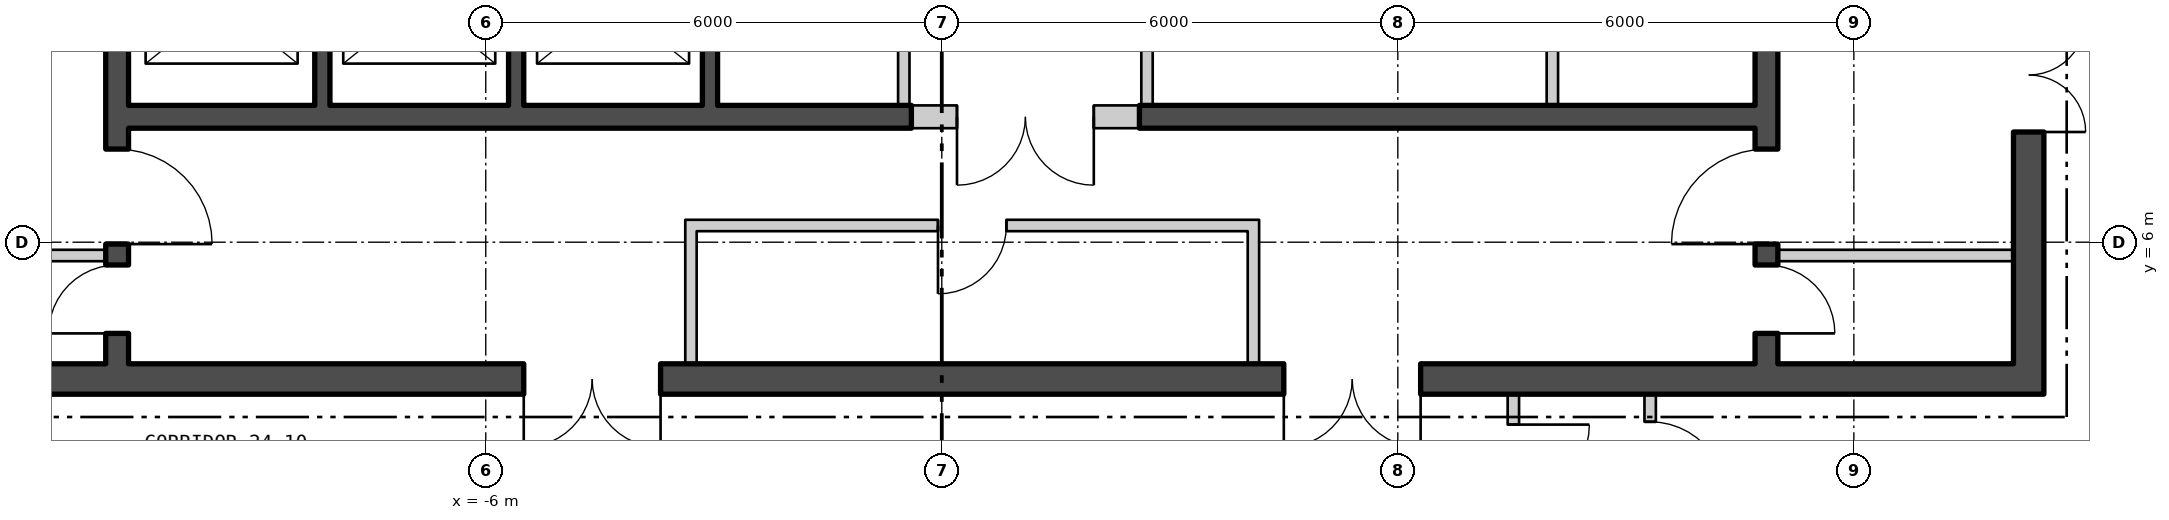
"""IFC4 building model, lengths in metres.
Left out: names, types, materials, properties, quantities, classifications, styles, units other than length and angle.
Written with IfcOpenShell. Run it as: python <this file> out.ifc"""

import sys

from ifc_helpers import new_model, si_unit, direction, frame, frame_2d, origin, place, context, subcontext, project, spatial, polyline, rectangle, outline, extrude, element, fill, save


model = new_model("IFC4")
c1 = context("Model", 3, precision=1e-05, world=origin(), true_north=direction((0.0, 1.0)))
c2 = subcontext(c1, "Body", "Model", "MODEL_VIEW")
j1 = project(units=[si_unit("LENGTHUNIT", "METRE"), si_unit("PLANEANGLEUNIT", "RADIAN")], contexts=[c1])
p1 = place(None, origin())
s1 = spatial("IfcSite", under=j1, at=p1, CompositionType="ELEMENT")
p2 = place(p1, origin())
s2 = spatial("IfcBuilding", under=s1, at=p2, CompositionType="ELEMENT")
p3 = place(p2, frame((0.0, 0.0, 312.6)))
s3 = spatial("IfcBuildingStorey", under=s2, at=p3, CompositionType="ELEMENT", Elevation=312.6)
p4 = place(p3, frame((-24.985, 16.303, -0.18), z_axis=(0.0, 0.0, 1.0), x_axis=(0.500000141277, -0.866025322218, 0.0)))
e1 = element("IfcWall", 1, at=p4, inside=s3, PredefinedType="SOLIDWALL", context=c2, shape_type="SweptSolid", body=[
    extrude(outline(polyline([(-0.13, -0.225), (45.86, -0.225), (45.6, 0.225), (0.13, 0.225), (-0.13, -0.225)])), origin(), (0.0, 0.0, 1.0), 3.98),
])
p5 = place(p4, frame((1.424, 0.0, 1.08)))
e2 = element("IfcOpeningElement", 2, at=p5, cuts=e1, PredefinedType="OPENING", context=c2, shape_type="SweptSolid", body=[
    extrude(rectangle(XDim=2.4, YDim=2.3, at=frame_2d((1.2, 1.15))), frame((0.0, 0.235, 0.0), z_axis=(0.0, -1.0, 0.0), x_axis=(1.0, 0.0, 0.0)), (0.0, 0.0, 1.0), 0.47),
])
p6 = place(p4, frame((5.892, 0.0, 1.08)))
e3 = element("IfcOpeningElement", 3, at=p6, cuts=e1, PredefinedType="OPENING", context=c2, shape_type="SweptSolid", body=[
    extrude(rectangle(XDim=2.4, YDim=2.3, at=frame_2d((1.2, 1.15))), frame((0.0, 0.235, 0.0), z_axis=(0.0, -1.0, 0.0), x_axis=(1.0, 0.0, 0.0)), (0.0, 0.0, 1.0), 0.47),
])
p7 = place(p4, frame((10.399, 0.0, 1.08)))
e4 = element("IfcOpeningElement", 4, at=p7, cuts=e1, PredefinedType="OPENING", context=c2, shape_type="SweptSolid", body=[
    extrude(rectangle(XDim=2.4, YDim=2.3, at=frame_2d((1.2, 1.15))), frame((0.0, 0.235, 0.0), z_axis=(0.0, -1.0, 0.0), x_axis=(1.0, 0.0, 0.0)), (0.0, 0.0, 1.0), 0.47),
])
p8 = place(p4, frame((14.905, 0.0, 1.08)))
e5 = element("IfcOpeningElement", 5, at=p8, cuts=e1, PredefinedType="OPENING", context=c2, shape_type="SweptSolid", body=[
    extrude(rectangle(XDim=2.4, YDim=2.3, at=frame_2d((1.2, 1.15))), frame((0.0, 0.235, 0.0), z_axis=(0.0, -1.0, 0.0), x_axis=(1.0, 0.0, 0.0)), (0.0, 0.0, 1.0), 0.47),
])
p9 = place(p4, frame((19.412, 0.0, 1.08)))
e6 = element("IfcOpeningElement", 6, at=p9, cuts=e1, PredefinedType="OPENING", context=c2, shape_type="SweptSolid", body=[
    extrude(rectangle(XDim=2.4, YDim=2.3, at=frame_2d((1.2, 1.15))), frame((0.0, 0.235, 0.0), z_axis=(0.0, -1.0, 0.0), x_axis=(1.0, 0.0, 0.0)), (0.0, 0.0, 1.0), 0.47),
])
p10 = place(p4, frame((23.918, 0.0, 1.08)))
e7 = element("IfcOpeningElement", 7, at=p10, cuts=e1, PredefinedType="OPENING", context=c2, shape_type="SweptSolid", body=[
    extrude(rectangle(XDim=2.4, YDim=2.3, at=frame_2d((1.2, 1.15))), frame((0.0, 0.235, 0.0), z_axis=(0.0, -1.0, 0.0), x_axis=(1.0, 0.0, 0.0)), (0.0, 0.0, 1.0), 0.47),
])
p11 = place(p4, frame((28.425, 0.0, 1.08)))
e8 = element("IfcOpeningElement", 8, at=p11, cuts=e1, PredefinedType="OPENING", context=c2, shape_type="SweptSolid", body=[
    extrude(rectangle(XDim=2.4, YDim=2.3, at=frame_2d((1.2, 1.15))), frame((0.0, 0.235, 0.0), z_axis=(0.0, -1.0, 0.0), x_axis=(1.0, 0.0, 0.0)), (0.0, 0.0, 1.0), 0.47),
])
p12 = place(p4, frame((37.438, 0.0, 1.08)))
e9 = element("IfcOpeningElement", 9, at=p12, cuts=e1, PredefinedType="OPENING", context=c2, shape_type="SweptSolid", body=[
    extrude(rectangle(XDim=2.4, YDim=2.3, at=frame_2d((1.2, 1.15))), frame((0.0, 0.235, 0.0), z_axis=(0.0, -1.0, 0.0), x_axis=(1.0, 0.0, 0.0)), (0.0, 0.0, 1.0), 0.47),
])
p13 = place(p4, frame((41.907, 0.0, 1.08)))
e10 = element("IfcOpeningElement", 10, at=p13, cuts=e1, PredefinedType="OPENING", context=c2, shape_type="SweptSolid", body=[
    extrude(rectangle(XDim=2.4, YDim=2.3, at=frame_2d((1.2, 1.15))), frame((0.0, 0.235, 0.0), z_axis=(0.0, -1.0, 0.0), x_axis=(1.0, 0.0, 0.0)), (0.0, 0.0, 1.0), 0.47),
])
p14 = place(p3, frame((2.12, -23.301, -0.18), z_axis=(0.0, 0.0, 1.0), x_axis=(0.500000141277, 0.866025322218, 0.0)))
e11 = element("IfcWall", 11, at=p14, inside=s3, PredefinedType="SOLIDWALL", context=c2, shape_type="SweptSolid", body=[
    extrude(outline(polyline([(-0.13, -0.225), (45.86, -0.225), (45.6, 0.225), (0.13, 0.225), (-0.13, -0.225)])), origin(), (0.0, 0.0, 1.0), 3.98),
])
p15 = place(p14, frame((1.424, 0.0, 1.08)))
e12 = element("IfcOpeningElement", 12, at=p15, cuts=e11, PredefinedType="OPENING", context=c2, shape_type="SweptSolid", body=[
    extrude(rectangle(XDim=2.4, YDim=2.3, at=frame_2d((1.2, 1.15))), frame((0.0, 0.235, 0.0), z_axis=(0.0, -1.0, 0.0), x_axis=(1.0, 0.0, 0.0)), (0.0, 0.0, 1.0), 0.47),
])
p16 = place(p14, frame((5.892, 0.0, 1.08)))
e13 = element("IfcOpeningElement", 13, at=p16, cuts=e11, PredefinedType="OPENING", context=c2, shape_type="SweptSolid", body=[
    extrude(rectangle(XDim=2.4, YDim=2.3, at=frame_2d((1.2, 1.15))), frame((0.0, 0.235, 0.0), z_axis=(0.0, -1.0, 0.0), x_axis=(1.0, 0.0, 0.0)), (0.0, 0.0, 1.0), 0.47),
])
p17 = place(p14, frame((14.905, 0.0, 1.08)))
e14 = element("IfcOpeningElement", 14, at=p17, cuts=e11, PredefinedType="OPENING", context=c2, shape_type="SweptSolid", body=[
    extrude(rectangle(XDim=2.4, YDim=2.3, at=frame_2d((1.2, 1.15))), frame((0.0, 0.235, 0.0), z_axis=(0.0, -1.0, 0.0), x_axis=(1.0, 0.0, 0.0)), (0.0, 0.0, 1.0), 0.47),
])
p18 = place(p14, frame((19.412, 0.0, 1.08)))
e15 = element("IfcOpeningElement", 15, at=p18, cuts=e11, PredefinedType="OPENING", context=c2, shape_type="SweptSolid", body=[
    extrude(rectangle(XDim=2.4, YDim=2.3, at=frame_2d((1.2, 1.15))), frame((0.0, 0.235, 0.0), z_axis=(0.0, -1.0, 0.0), x_axis=(1.0, 0.0, 0.0)), (0.0, 0.0, 1.0), 0.47),
])
p19 = place(p14, frame((23.918, 0.0, 1.08)))
e16 = element("IfcOpeningElement", 16, at=p19, cuts=e11, PredefinedType="OPENING", context=c2, shape_type="SweptSolid", body=[
    extrude(rectangle(XDim=2.4, YDim=2.3, at=frame_2d((1.2, 1.15))), frame((0.0, 0.235, 0.0), z_axis=(0.0, -1.0, 0.0), x_axis=(1.0, 0.0, 0.0)), (0.0, 0.0, 1.0), 0.47),
])
p20 = place(p14, frame((28.425, 0.0, 1.08)))
e17 = element("IfcOpeningElement", 17, at=p20, cuts=e11, PredefinedType="OPENING", context=c2, shape_type="SweptSolid", body=[
    extrude(rectangle(XDim=2.4, YDim=2.3, at=frame_2d((1.2, 1.15))), frame((0.0, 0.235, 0.0), z_axis=(0.0, -1.0, 0.0), x_axis=(1.0, 0.0, 0.0)), (0.0, 0.0, 1.0), 0.47),
])
p21 = place(p14, frame((37.438, 0.0, 1.08)))
e18 = element("IfcOpeningElement", 18, at=p21, cuts=e11, PredefinedType="OPENING", context=c2, shape_type="SweptSolid", body=[
    extrude(rectangle(XDim=2.4, YDim=2.3, at=frame_2d((1.2, 1.15))), frame((0.0, 0.235, 0.0), z_axis=(0.0, -1.0, 0.0), x_axis=(1.0, 0.0, 0.0)), (0.0, 0.0, 1.0), 0.47),
])
p22 = place(p14, frame((41.907, 0.0, 1.08)))
e19 = element("IfcOpeningElement", 19, at=p22, cuts=e11, PredefinedType="OPENING", context=c2, shape_type="SweptSolid", body=[
    extrude(rectangle(XDim=2.4, YDim=2.3, at=frame_2d((1.2, 1.15))), frame((0.0, 0.235, 0.0), z_axis=(0.0, -1.0, 0.0), x_axis=(1.0, 0.0, 0.0)), (0.0, 0.0, 1.0), 0.47),
])
p23 = place(p3, frame((-14.5, 4.2, 0.0), z_axis=(0.0, 0.0, 1.0), x_axis=(1.0, 0.0, 0.0)))
e20 = element("IfcWall", 20, at=p23, inside=s3, PredefinedType="SHEAR", context=c2, shape_type="SweptSolid", body=[
    extrude(rectangle(XDim=29.0, YDim=0.4, at=frame_2d((14.5, 0.0))), origin(), (0.0, 0.0, 1.0), 4.0),
])
p24 = place(p23, frame((9.0, 0.0, 0.0)))
e21 = element("IfcOpeningElement", 21, at=p24, cuts=e20, PredefinedType="OPENING", context=c2, shape_type="SweptSolid", body=[
    extrude(rectangle(XDim=1.8, YDim=2.4, at=frame_2d((0.9, 1.2))), frame((0.0, 0.21, 0.0), z_axis=(0.0, -1.0, 0.0), x_axis=(1.0, 0.0, 0.0)), (0.0, 0.0, 1.0), 0.42),
])
p25 = place(p23, frame((19.0, 0.0, 0.0)))
e22 = element("IfcOpeningElement", 22, at=p25, cuts=e20, PredefinedType="OPENING", context=c2, shape_type="SweptSolid", body=[
    extrude(rectangle(XDim=1.8, YDim=2.4, at=frame_2d((0.9, 1.2))), frame((0.0, 0.21, 0.0), z_axis=(0.0, -1.0, 0.0), x_axis=(1.0, 0.0, 0.0)), (0.0, 0.0, 1.0), 0.42),
])
p26 = place(p3, frame((14.3, 4.4, 0.0), z_axis=(0.0, 0.0, 1.0), x_axis=(0.0, 1.0, 0.0)))
e23 = element("IfcWall", 23, at=p26, inside=s3, PredefinedType="SHEAR", context=c2, shape_type="SweptSolid", body=[
    extrude(rectangle(XDim=13.2, YDim=0.4, at=frame_2d((6.6, 0.0))), origin(), (0.0, 0.0, 1.0), 4.0),
])
p27 = place(p26, frame((3.05, 0.0, 0.0)))
e24 = element("IfcOpeningElement", 24, at=p27, cuts=e23, PredefinedType="OPENING", context=c2, shape_type="SweptSolid", body=[
    extrude(rectangle(XDim=1.5, YDim=2.1, at=frame_2d((0.75, 1.05))), frame((0.0, 0.21, 0.0), z_axis=(0.0, -1.0, 0.0), x_axis=(1.0, 0.0, 0.0)), (0.0, 0.0, 1.0), 0.42),
])
p28 = place(p3, frame((-10.85, 4.4, 0.0), z_axis=(0.0, 0.0, 1.0), x_axis=(0.0, 1.0, 0.0)))
e25 = element("IfcWall", 25, at=p28, inside=s3, PredefinedType="SHEAR", context=c2, shape_type="SweptSolid", body=[
    extrude(rectangle(XDim=13.2, YDim=0.3, at=frame_2d((6.6, 0.0))), origin(), (0.0, 0.0, 1.0), 4.0),
])
p29 = place(p28, frame((1.575, 0.0, 0.0)))
e26 = element("IfcOpeningElement", 26, at=p29, cuts=e25, PredefinedType="OPENING", context=c2, shape_type="SweptSolid", body=[
    extrude(rectangle(XDim=1.25, YDim=2.1, at=frame_2d((0.625, 1.05))), frame((0.0, 0.16, 0.0), z_axis=(0.0, -1.0, 0.0), x_axis=(1.0, 0.0, 0.0)), (0.0, 0.0, 1.0), 0.32),
])
p30 = place(p28, frame((0.4, 0.0, 0.0)))
e27 = element("IfcOpeningElement", 27, at=p30, cuts=e25, PredefinedType="OPENING", context=c2, shape_type="SweptSolid", body=[
    extrude(rectangle(XDim=0.9, YDim=2.1, at=frame_2d((0.45, 1.05))), frame((0.0, 0.16, 0.0), z_axis=(0.0, -1.0, 0.0), x_axis=(1.0, 0.0, 0.0)), (0.0, 0.0, 1.0), 0.32),
])
p31 = place(p3, frame((10.85, 4.4, 0.0), z_axis=(0.0, 0.0, 1.0), x_axis=(0.0, 1.0, 0.0)))
e28 = element("IfcWall", 28, at=p31, inside=s3, PredefinedType="SHEAR", context=c2, shape_type="SweptSolid", body=[
    extrude(rectangle(XDim=13.2, YDim=0.3, at=frame_2d((6.6, 0.0))), origin(), (0.0, 0.0, 1.0), 4.0),
])
p32 = place(p31, frame((1.575, 0.0, 0.0)))
e29 = element("IfcOpeningElement", 29, at=p32, cuts=e28, PredefinedType="OPENING", context=c2, shape_type="SweptSolid", body=[
    extrude(rectangle(XDim=1.25, YDim=2.1, at=frame_2d((0.625, 1.05))), frame((0.0, 0.16, 0.0), z_axis=(0.0, -1.0, 0.0), x_axis=(1.0, 0.0, 0.0)), (0.0, 0.0, 1.0), 0.32),
])
p33 = place(p31, frame((0.4, 0.0, 0.0)))
e30 = element("IfcOpeningElement", 30, at=p33, cuts=e28, PredefinedType="OPENING", context=c2, shape_type="SweptSolid", body=[
    extrude(rectangle(XDim=0.9, YDim=2.1, at=frame_2d((0.45, 1.05))), frame((0.0, 0.16, 0.0), z_axis=(0.0, -1.0, 0.0), x_axis=(1.0, 0.0, 0.0)), (0.0, 0.0, 1.0), 0.32),
])
p34 = place(p3, frame((-10.7, 7.65, 0.0), z_axis=(0.0, 0.0, 1.0), x_axis=(1.0, 0.0, 0.0)))
e31 = element("IfcWall", 31, at=p34, inside=s3, PredefinedType="SHEAR", context=c2, shape_type="SweptSolid", body=[
    extrude(rectangle(XDim=10.3, YDim=0.3, at=frame_2d((5.15, 0.0))), origin(), (0.0, 0.0, 1.0), 4.0),
])
p35 = place(p3, frame((2.6, 7.65, 0.0), z_axis=(0.0, 0.0, 1.0), x_axis=(1.0, 0.0, 0.0)))
e32 = element("IfcWall", 32, at=p35, inside=s3, PredefinedType="SHEAR", context=c2, shape_type="SweptSolid", body=[
    extrude(rectangle(XDim=8.1, YDim=0.3, at=frame_2d((4.05, 0.0))), origin(), (0.0, 0.0, 1.0), 4.0),
])
for number, where, z_axis, x_axis in (
    (33, (-8.15, 7.8, 0.0), (0.0, 0.0, 1.0), (0.0, 1.0, 0.0)),
    (34, (-5.6, 7.8, 0.0), (0.0, 0.0, 1.0), (0.0, 1.0, 0.0)),
    (35, (-3.05, 7.8, 0.0), (0.0, 0.0, 1.0), (0.0, 1.0, 0.0)),
):
    element("IfcWall", number, at=place(p3, frame(where, z_axis=z_axis, x_axis=x_axis)), inside=s3, PredefinedType="SHEAR", context=c2, shape_type="SweptSolid", body=[
        extrude(rectangle(XDim=2.7, YDim=0.2, at=frame_2d((1.35, 0.0))), origin(), (0.0, 0.0, 1.0), 4.0),
    ])
for number, where, z_axis, x_axis in (
    (36, (-0.5, 7.8, 0.0), (0.0, 0.0, 1.0), (0.0, 1.0, 0.0)),
    (37, (2.7, 7.8, 0.0), (0.0, 0.0, 1.0), (0.0, 1.0, 0.0)),
    (38, (8.033, 7.8, 0.0), (0.0, 0.0, 1.0), (0.0, 1.0, 0.0)),
):
    element("IfcWall", number, at=place(p3, frame(where, z_axis=z_axis, x_axis=x_axis)), inside=s3, PredefinedType="PARTITIONING", context=c2, shape_type="SweptSolid", body=[
        extrude(rectangle(XDim=2.7, YDim=0.15, at=frame_2d((1.35, 0.0))), origin(), (0.0, 0.0, 1.0), 4.0),
    ])
for number, where, z_axis, x_axis in (
    (39, (-14.1, 5.825, 0.0), (0.0, 0.0, 1.0), (1.0, 0.0, 0.0)),
    (40, (11.0, 5.825, 0.0), (0.0, 0.0, 1.0), (1.0, 0.0, 0.0)),
):
    element("IfcWall", number, at=place(p3, frame(where, z_axis=z_axis, x_axis=x_axis)), inside=s3, PredefinedType="PARTITIONING", context=c2, shape_type="SweptSolid", body=[
        extrude(rectangle(XDim=3.1, YDim=0.15, at=frame_2d((1.55, 0.0))), origin(), (0.0, 0.0, 1.0), 4.0),
    ])
for number, where, z_axis, x_axis in (
    (41, (-3.3, 4.4, 0.0), (0.0, 0.0, 1.0), (0.0, 1.0, 0.0)),
    (42, (4.1, 4.4, 0.0), (0.0, 0.0, 1.0), (0.0, 1.0, 0.0)),
):
    element("IfcWall", number, at=place(p3, frame(where, z_axis=z_axis, x_axis=x_axis)), inside=s3, PredefinedType="PARTITIONING", context=c2, shape_type="SweptSolid", body=[
        extrude(rectangle(XDim=1.895, YDim=0.15, at=frame_2d((0.948, 0.0))), origin(), (0.0, 0.0, 1.0), 4.0),
    ])
p36 = place(p3, frame((-3.225, 6.22, 0.0), z_axis=(0.0, 0.0, 1.0), x_axis=(1.0, 0.0, 0.0)))
e43 = element("IfcWall", 43, at=p36, inside=s3, PredefinedType="PARTITIONING", context=c2, shape_type="SweptSolid", body=[
    extrude(rectangle(XDim=7.25, YDim=0.15, at=frame_2d((3.625, 0.0))), origin(), (0.0, 0.0, 1.0), 4.0),
])
p37 = place(p36, frame((3.175, 0.0, 0.0)))
e44 = element("IfcOpeningElement", 44, at=p37, cuts=e43, PredefinedType="OPENING", context=c2, shape_type="SweptSolid", body=[
    extrude(rectangle(XDim=0.9, YDim=2.1, at=frame_2d((0.45, 1.05))), frame((0.0, 0.085, 0.0), z_axis=(0.0, -1.0, 0.0), x_axis=(1.0, 0.0, 0.0)), (0.0, 0.0, 1.0), 0.17),
])
p38 = place(p3, frame((-0.4, 7.65, 0.0), z_axis=(0.0, 0.0, 1.0), x_axis=(1.0, 0.0, 0.0)))
e45 = element("IfcWall", 45, at=p38, inside=s3, PredefinedType="PARTITIONING", context=c2, shape_type="SweptSolid", body=[
    extrude(rectangle(XDim=3.0, YDim=0.3, at=frame_2d((1.5, 0.0))), origin(), (0.0, 0.0, 1.0), 4.0),
])
p39 = place(p38, frame((0.6, 0.0, 0.0)))
e46 = element("IfcOpeningElement", 46, at=p39, cuts=e45, PredefinedType="OPENING", context=c2, shape_type="SweptSolid", body=[
    extrude(rectangle(XDim=1.8, YDim=2.4, at=frame_2d((0.9, 1.2))), frame((0.0, 0.16, 0.0), z_axis=(0.0, -1.0, 0.0), x_axis=(1.0, 0.0, 0.0)), (0.0, 0.0, 1.0), 0.32),
])
p40 = place(p3, frame((7.52, -13.498, 0.0), z_axis=(0.0, 0.0, 1.0), x_axis=(0.0, 1.0, 0.0)))
e47 = element("IfcWall", 47, at=p40, inside=s3, PredefinedType="PARTITIONING", context=c2, shape_type="SweptSolid", body=[
    extrude(rectangle(XDim=17.498, YDim=0.15, at=frame_2d((8.749, 0.0))), origin(), (0.0, 0.0, 1.0), 4.0),
])
p41 = place(p40, frame((3.639, 0.0, 0.0)))
e48 = element("IfcOpeningElement", 48, at=p41, cuts=e47, PredefinedType="OPENING", context=c2, shape_type="SweptSolid", body=[
    extrude(rectangle(XDim=1.0, YDim=2.1, at=frame_2d((0.5, 1.05))), frame((0.0, 0.085, 0.0), z_axis=(0.0, -1.0, 0.0), x_axis=(1.0, 0.0, 0.0)), (0.0, 0.0, 1.0), 0.17),
])
p42 = place(p40, frame((12.808, 0.0, 0.0)))
e49 = element("IfcOpeningElement", 49, at=p42, cuts=e47, PredefinedType="OPENING", context=c2, shape_type="SweptSolid", body=[
    extrude(rectangle(XDim=1.0, YDim=2.1, at=frame_2d((0.5, 1.05))), frame((0.0, 0.085, 0.0), z_axis=(0.0, -1.0, 0.0), x_axis=(1.0, 0.0, 0.0)), (0.0, 0.0, 1.0), 0.17),
])
p43 = place(p40, frame((16.098, 0.0, 0.0)))
e50 = element("IfcOpeningElement", 50, at=p43, cuts=e47, PredefinedType="OPENING", context=c2, shape_type="SweptSolid", body=[
    extrude(rectangle(XDim=1.0, YDim=2.1, at=frame_2d((0.5, 1.05))), frame((0.0, 0.085, 0.0), z_axis=(0.0, -1.0, 0.0), x_axis=(1.0, 0.0, 0.0)), (0.0, 0.0, 1.0), 0.17),
])
p44 = place(p3, frame((9.32, 2.275, 0.0), z_axis=(0.0, 0.0, 1.0), x_axis=(0.0, 1.0, 0.0)))
e51 = element("IfcWall", 51, at=p44, inside=s3, PredefinedType="PARTITIONING", context=c2, shape_type="SweptSolid", body=[
    extrude(rectangle(XDim=1.725, YDim=0.15, at=frame_2d((0.863, 0.0))), origin(), (0.0, 0.0, 1.0), 4.0),
])
p45 = place(p44, frame((0.362, 0.0, 0.0)))
e52 = element("IfcOpeningElement", 52, at=p45, cuts=e51, PredefinedType="OPENING", context=c2, shape_type="SweptSolid", body=[
    extrude(rectangle(XDim=1.0, YDim=2.1, at=frame_2d((0.5, 1.05))), frame((0.0, 0.085, 0.0), z_axis=(0.0, -1.0, 0.0), x_axis=(1.0, 0.0, 0.0)), (0.0, 0.0, 1.0), 0.17),
])
p46 = place(p29, origin())
e53 = element("IfcDoor", 53, at=p46, inside=s3, OperationType="SINGLE_SWING_LEFT", PredefinedType="DOOR", context=c2, shape_type="SweptSolid", body=[
    extrude(rectangle(XDim=1.25, YDim=2.1, at=frame_2d((0.625, 1.05))), frame((0.0, 0.025, 0.0), z_axis=(0.0, -1.0, 0.0), x_axis=(1.0, 0.0, 0.0)), (0.0, 0.0, 1.0), 0.05),
])
fill(e26, e53)
p47 = place(p30, origin())
e54 = element("IfcDoor", 54, at=p47, inside=s3, OperationType="SINGLE_SWING_RIGHT", PredefinedType="DOOR", context=c2, shape_type="SweptSolid", body=[
    extrude(rectangle(XDim=0.9, YDim=2.1, at=frame_2d((0.45, 1.05))), frame((0.0, 0.025, 0.0), z_axis=(0.0, -1.0, 0.0), x_axis=(1.0, 0.0, 0.0)), (0.0, 0.0, 1.0), 0.05),
])
fill(e27, e54)
p48 = place(p32, origin())
e55 = element("IfcDoor", 55, at=p48, inside=s3, OperationType="SINGLE_SWING_RIGHT", PredefinedType="DOOR", context=c2, shape_type="SweptSolid", body=[
    extrude(rectangle(XDim=1.25, YDim=2.1, at=frame_2d((0.625, 1.05))), frame((0.0, 0.025, 0.0), z_axis=(0.0, -1.0, 0.0), x_axis=(1.0, 0.0, 0.0)), (0.0, 0.0, 1.0), 0.05),
])
fill(e29, e55)
p49 = place(p27, origin())
e56 = element("IfcDoor", 56, at=p49, inside=s3, OperationType="DOUBLE_DOOR_SINGLE_SWING", PredefinedType="DOOR", context=c2, shape_type="SweptSolid", body=[
    extrude(rectangle(XDim=1.5, YDim=2.1, at=frame_2d((0.75, 1.05))), frame((0.0, 0.025, 0.0), z_axis=(0.0, -1.0, 0.0), x_axis=(1.0, 0.0, 0.0)), (0.0, 0.0, 1.0), 0.05),
])
fill(e24, e56)
p50 = place(p33, origin())
e57 = element("IfcDoor", 57, at=p50, inside=s3, OperationType="SINGLE_SWING_LEFT", PredefinedType="DOOR", context=c2, shape_type="SweptSolid", body=[
    extrude(rectangle(XDim=0.9, YDim=2.1, at=frame_2d((0.45, 1.05))), frame((0.0, 0.025, 0.0), z_axis=(0.0, -1.0, 0.0), x_axis=(1.0, 0.0, 0.0)), (0.0, 0.0, 1.0), 0.05),
])
fill(e30, e57)
p51 = place(p37, origin())
e58 = element("IfcDoor", 58, at=p51, inside=s3, OperationType="SINGLE_SWING_LEFT", PredefinedType="DOOR", context=c2, shape_type="SweptSolid", body=[
    extrude(rectangle(XDim=0.9, YDim=2.1, at=frame_2d((0.45, 1.05))), frame((0.0, 0.025, 0.0), z_axis=(0.0, -1.0, 0.0), x_axis=(1.0, 0.0, 0.0)), (0.0, 0.0, 1.0), 0.05),
])
fill(e44, e58)
p52 = place(p39, origin())
e59 = element("IfcDoor", 59, at=p52, inside=s3, OperationType="DOUBLE_DOOR_SINGLE_SWING", PredefinedType="DOOR", context=c2, shape_type="SweptSolid", body=[
    extrude(rectangle(XDim=1.8, YDim=2.4, at=frame_2d((0.9, 1.2))), frame((0.0, 0.025, 0.0), z_axis=(0.0, -1.0, 0.0), x_axis=(1.0, 0.0, 0.0)), (0.0, 0.0, 1.0), 0.05),
])
fill(e46, e59)
p53 = place(p24, origin())
e60 = element("IfcDoor", 60, at=p53, inside=s3, OperationType="DOUBLE_DOOR_SINGLE_SWING", PredefinedType="DOOR", context=c2, shape_type="SweptSolid", body=[
    extrude(rectangle(XDim=1.8, YDim=2.4, at=frame_2d((0.9, 1.2))), frame((0.0, 0.025, 0.0), z_axis=(0.0, -1.0, 0.0), x_axis=(1.0, 0.0, 0.0)), (0.0, 0.0, 1.0), 0.05),
])
fill(e21, e60)
p54 = place(p25, origin())
e61 = element("IfcDoor", 61, at=p54, inside=s3, OperationType="DOUBLE_DOOR_SINGLE_SWING", PredefinedType="DOOR", context=c2, shape_type="SweptSolid", body=[
    extrude(rectangle(XDim=1.8, YDim=2.4, at=frame_2d((0.9, 1.2))), frame((0.0, 0.025, 0.0), z_axis=(0.0, -1.0, 0.0), x_axis=(1.0, 0.0, 0.0)), (0.0, 0.0, 1.0), 0.05),
])
fill(e22, e61)
p55 = place(p43, origin())
e62 = element("IfcDoor", 62, at=p55, inside=s3, OperationType="SINGLE_SWING_RIGHT", PredefinedType="DOOR", context=c2, shape_type="SweptSolid", body=[
    extrude(rectangle(XDim=1.0, YDim=2.1, at=frame_2d((0.5, 1.05))), frame((0.0, 0.025, 0.0), z_axis=(0.0, -1.0, 0.0), x_axis=(1.0, 0.0, 0.0)), (0.0, 0.0, 1.0), 0.05),
])
fill(e50, e62)
p56 = place(p45, origin())
e63 = element("IfcDoor", 63, at=p56, inside=s3, OperationType="SINGLE_SWING_LEFT", PredefinedType="DOOR", context=c2, shape_type="SweptSolid", body=[
    extrude(rectangle(XDim=1.0, YDim=2.1, at=frame_2d((0.5, 1.05))), frame((0.0, 0.025, 0.0), z_axis=(0.0, -1.0, 0.0), x_axis=(1.0, 0.0, 0.0)), (0.0, 0.0, 1.0), 0.05),
])
fill(e52, e63)
save(model, sys.argv[1])
